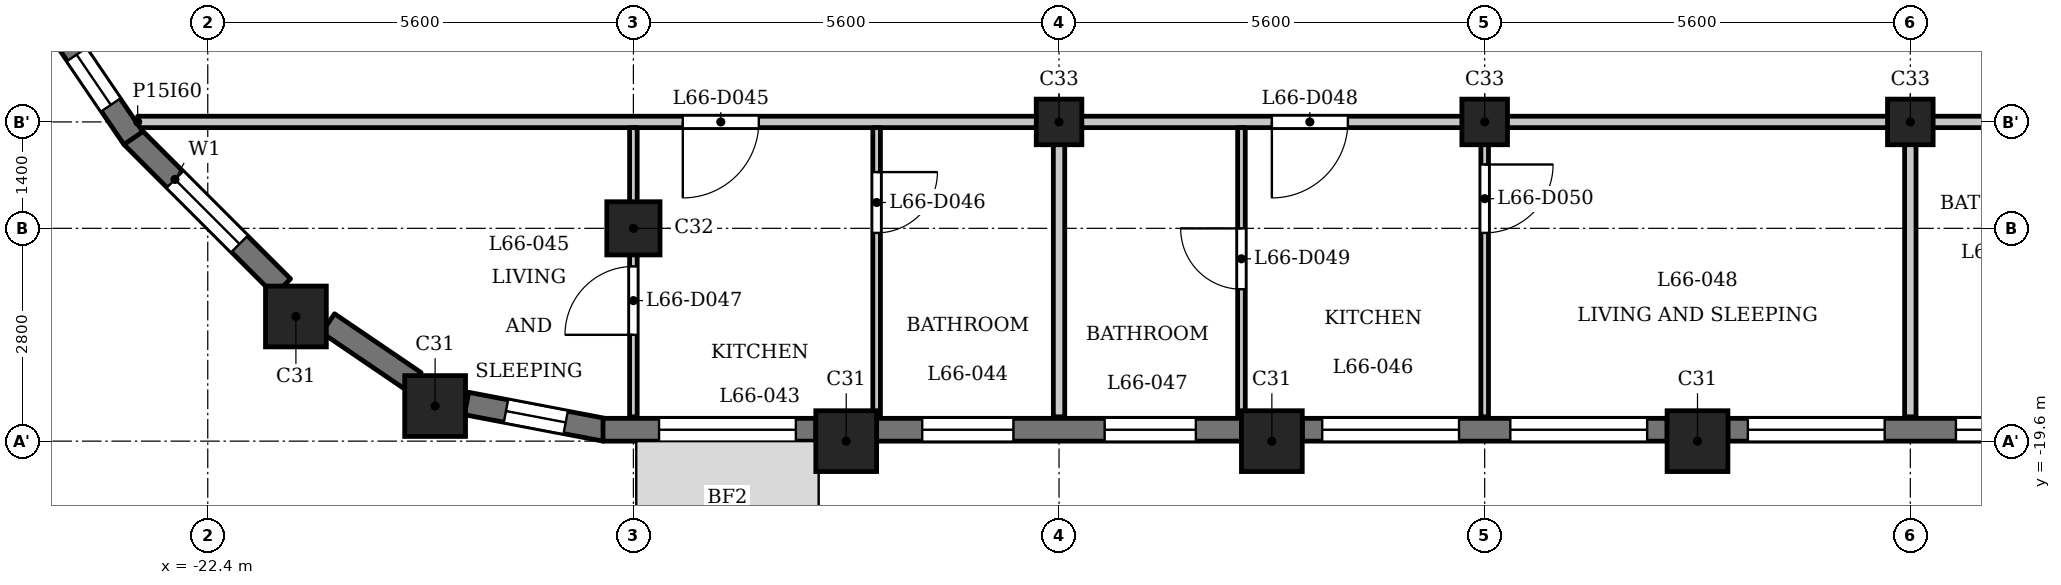
"""IFC4 building model, lengths in metres.
Left out: names, types, materials, properties, quantities, classifications, styles, units other than length and angle.
Written with IfcOpenShell. Run it as: python <this file> out.ifc"""

import sys

from ifc_helpers import new_model, si_unit, direction, frame, frame_2d, origin, origin_2d, place, context, subcontext, project, spatial, rectangle, extrude, element, fill, save


model = new_model("IFC4")
c1 = context("Model", 3, precision=1e-05, world=origin(), true_north=direction((0.0, 1.0)))
c2 = subcontext(c1, "Body", "Model", "MODEL_VIEW")
j1 = project(units=[si_unit("LENGTHUNIT", "METRE"), si_unit("PLANEANGLEUNIT", "RADIAN")], contexts=[c1])
p1 = place(None, origin())
s1 = spatial("IfcSite", under=j1, at=p1, CompositionType="ELEMENT")
p2 = place(p1, origin())
s2 = spatial("IfcBuilding", under=s1, at=p2, CompositionType="ELEMENT")
p3 = place(p2, frame((0.0, 0.0, 255.7)))
s3 = spatial("IfcBuildingStorey", under=s2, at=p3, CompositionType="ELEMENT", Elevation=255.7)
for number, where, z_axis, x_axis in (
    (1, (-19.409, -19.138, 0.0), (0.0, 0.0, 1.0), (1.0, 0.0, 0.0)),
    (2, (-14.0, -19.6, 0.0), (0.0, 0.0, 1.0), (1.0, 0.0, 0.0)),
    (3, (-8.4, -19.6, 0.0), (0.0, 0.0, 1.0), (1.0, 0.0, 0.0)),
    (4, (-2.8, -19.6, 0.0), (0.0, 0.0, 1.0), (1.0, 0.0, 0.0)),
    (5, (-21.24, -17.96, 0.0), (0.0, 0.0, 1.0), (1.0, 0.0, 0.0)),
):
    element("IfcColumn", number, at=place(p3, frame(where, z_axis=z_axis, x_axis=x_axis)), inside=s3, PredefinedType="COLUMN", context=c2, shape_type="SweptSolid", body=[
        extrude(rectangle(XDim=0.8, YDim=0.8, at=origin_2d()), origin(), (0.0, 0.0, 1.0), 3.5),
    ])
p4 = place(p3, frame((-16.8, -16.8, 0.0), z_axis=(0.0, 0.0, 1.0), x_axis=(1.0, 0.0, 0.0)))
e6 = element("IfcColumn", 6, at=p4, inside=s3, PredefinedType="COLUMN", context=c2, shape_type="SweptSolid", body=[
    extrude(rectangle(XDim=0.7, YDim=0.7, at=origin_2d()), origin(), (0.0, 0.0, 1.0), 3.5),
])
for number, where, z_axis, x_axis in (
    (7, (-11.2, -15.4, 0.0), (0.0, 0.0, 1.0), (1.0, 0.0, 0.0)),
    (8, (-5.6, -15.4, 0.0), (0.0, 0.0, 1.0), (1.0, 0.0, 0.0)),
    (9, (0.0, -15.4, 0.0), (0.0, 0.0, 1.0), (1.0, 0.0, 0.0)),
):
    element("IfcColumn", number, at=place(p3, frame(where, z_axis=z_axis, x_axis=x_axis)), inside=s3, PredefinedType="COLUMN", context=c2, shape_type="SweptSolid", body=[
        extrude(rectangle(XDim=0.6, YDim=0.6, at=origin_2d()), origin(), (0.0, 0.0, 1.0), 3.5),
    ])
p5 = place(p3, frame((-23.397, -15.591, 0.0), z_axis=(0.0, 0.0, 1.0), x_axis=(0.707150377276, -0.707063182409, 0.0)))
e10 = element("IfcWall", 10, at=p5, inside=s3, PredefinedType="SOLIDWALL", context=c2, shape_type="SweptSolid", body=[
    extrude(rectangle(XDim=2.8, YDim=0.3, at=frame_2d((1.4, 0.0))), origin(), (0.0, 0.0, 1.0), 2.55),
])
p6 = place(p5, frame((0.8, 0.0, 0.6)))
e11 = element("IfcOpeningElement", 11, at=p6, cuts=e10, PredefinedType="OPENING", context=c2, shape_type="SweptSolid", body=[
    extrude(rectangle(XDim=1.2, YDim=1.55, at=frame_2d((0.6, 0.775))), frame((0.0, 0.16, 0.0), z_axis=(0.0, -1.0, 0.0), x_axis=(1.0, 0.0, 0.0)), (0.0, 0.0, 1.0), 0.32),
])
p7 = place(p3, frame((-20.817, -18.048, 0.0), z_axis=(0.0, 0.0, 1.0), x_axis=(0.827025410886, -0.562164539747, 0.0)))
e12 = element("IfcWall", 12, at=p7, inside=s3, PredefinedType="SOLIDWALL", context=c2, shape_type="SweptSolid", body=[
    extrude(rectangle(XDim=1.377, YDim=0.3, at=frame_2d((0.688, 0.0))), origin(), (0.0, 0.0, 1.0), 2.55),
])
p8 = place(p3, frame((-18.995, -19.105, 0.0), z_axis=(0.0, 0.0, 1.0), x_axis=(0.982301706131, -0.187305520826, 0.0)))
e13 = element("IfcWall", 13, at=p8, inside=s3, PredefinedType="SOLIDWALL", context=c2, shape_type="SweptSolid", body=[
    extrude(rectangle(XDim=1.856, YDim=0.3, at=frame_2d((0.928, 0.0))), origin(), (0.0, 0.0, 1.0), 2.55),
])
p9 = place(p8, frame((0.528, 0.0, 0.6)))
e14 = element("IfcOpeningElement", 14, at=p9, cuts=e13, PredefinedType="OPENING", context=c2, shape_type="SweptSolid", body=[
    extrude(rectangle(XDim=0.8, YDim=1.55, at=frame_2d((0.4, 0.775))), frame((0.0, 0.16, 0.0), z_axis=(0.0, -1.0, 0.0), x_axis=(1.0, 0.0, 0.0)), (0.0, 0.0, 1.0), 0.32),
])
p10 = place(p3, frame((-17.2, -19.45, 0.0), z_axis=(0.0, 0.0, 1.0), x_axis=(1.0, 0.0, 0.0)))
e15 = element("IfcWall", 15, at=p10, inside=s3, PredefinedType="SOLIDWALL", context=c2, shape_type="SweptSolid", body=[
    extrude(rectangle(XDim=2.8, YDim=0.3, at=frame_2d((1.4, 0.0))), origin(), (0.0, 0.0, 1.0), 2.55),
])
p11 = place(p10, frame((0.738, 0.0, 0.9)))
e16 = element("IfcOpeningElement", 16, at=p11, cuts=e15, PredefinedType="OPENING", context=c2, shape_type="SweptSolid", body=[
    extrude(rectangle(XDim=1.8, YDim=1.25, at=frame_2d((0.9, 0.625))), frame((0.0, 0.16, 0.0), z_axis=(0.0, -1.0, 0.0), x_axis=(1.0, 0.0, 0.0)), (0.0, 0.0, 1.0), 0.32),
])
p12 = place(p3, frame((-13.6, -19.45, 0.0), z_axis=(0.0, 0.0, 1.0), x_axis=(1.0, 0.0, 0.0)))
e17 = element("IfcWall", 17, at=p12, inside=s3, PredefinedType="SOLIDWALL", context=c2, shape_type="SweptSolid", body=[
    extrude(rectangle(XDim=4.8, YDim=0.3, at=frame_2d((2.4, 0.0))), origin(), (0.0, 0.0, 1.0), 2.55),
])
p13 = place(p12, frame((0.6, 0.0, 0.6)))
e18 = element("IfcOpeningElement", 18, at=p13, cuts=e17, PredefinedType="OPENING", context=c2, shape_type="SweptSolid", body=[
    extrude(rectangle(XDim=1.2, YDim=1.55, at=frame_2d((0.6, 0.775))), frame((0.0, 0.16, 0.0), z_axis=(0.0, -1.0, 0.0), x_axis=(1.0, 0.0, 0.0)), (0.0, 0.0, 1.0), 0.32),
])
p14 = place(p12, frame((3.0, 0.0, 0.6)))
e19 = element("IfcOpeningElement", 19, at=p14, cuts=e17, PredefinedType="OPENING", context=c2, shape_type="SweptSolid", body=[
    extrude(rectangle(XDim=1.2, YDim=1.55, at=frame_2d((0.6, 0.775))), frame((0.0, 0.16, 0.0), z_axis=(0.0, -1.0, 0.0), x_axis=(1.0, 0.0, 0.0)), (0.0, 0.0, 1.0), 0.32),
])
p15 = place(p3, frame((-8.0, -19.45, 0.0), z_axis=(0.0, 0.0, 1.0), x_axis=(1.0, 0.0, 0.0)))
e20 = element("IfcWall", 20, at=p15, inside=s3, PredefinedType="SOLIDWALL", context=c2, shape_type="SweptSolid", body=[
    extrude(rectangle(XDim=4.8, YDim=0.3, at=frame_2d((2.4, 0.0))), origin(), (0.0, 0.0, 1.0), 2.55),
])
p16 = place(p15, frame((0.262, 0.0, 0.9)))
e21 = element("IfcOpeningElement", 21, at=p16, cuts=e20, PredefinedType="OPENING", context=c2, shape_type="SweptSolid", body=[
    extrude(rectangle(XDim=1.8, YDim=1.25, at=frame_2d((0.9, 0.625))), frame((0.0, 0.16, 0.0), z_axis=(0.0, -1.0, 0.0), x_axis=(1.0, 0.0, 0.0)), (0.0, 0.0, 1.0), 0.32),
])
p17 = place(p15, frame((2.738, 0.0, 0.9)))
e22 = element("IfcOpeningElement", 22, at=p17, cuts=e20, PredefinedType="OPENING", context=c2, shape_type="SweptSolid", body=[
    extrude(rectangle(XDim=1.8, YDim=1.25, at=frame_2d((0.9, 0.625))), frame((0.0, 0.16, 0.0), z_axis=(0.0, -1.0, 0.0), x_axis=(1.0, 0.0, 0.0)), (0.0, 0.0, 1.0), 0.32),
])
p18 = place(p3, frame((-2.4, -19.45, 0.0), z_axis=(0.0, 0.0, 1.0), x_axis=(1.0, 0.0, 0.0)))
e23 = element("IfcWall", 23, at=p18, inside=s3, PredefinedType="SOLIDWALL", context=c2, shape_type="SweptSolid", body=[
    extrude(rectangle(XDim=4.8, YDim=0.3, at=frame_2d((2.4, 0.0))), origin(), (0.0, 0.0, 1.0), 2.55),
])
p19 = place(p18, frame((0.262, 0.0, 0.9)))
e24 = element("IfcOpeningElement", 24, at=p19, cuts=e23, PredefinedType="OPENING", context=c2, shape_type="SweptSolid", body=[
    extrude(rectangle(XDim=1.8, YDim=1.25, at=frame_2d((0.9, 0.625))), frame((0.0, 0.16, 0.0), z_axis=(0.0, -1.0, 0.0), x_axis=(1.0, 0.0, 0.0)), (0.0, 0.0, 1.0), 0.32),
])
p20 = place(p18, frame((3.0, 0.0, 0.6)))
e25 = element("IfcOpeningElement", 25, at=p20, cuts=e23, PredefinedType="OPENING", context=c2, shape_type="SweptSolid", body=[
    extrude(rectangle(XDim=1.2, YDim=1.55, at=frame_2d((0.6, 0.775))), frame((0.0, 0.16, 0.0), z_axis=(0.0, -1.0, 0.0), x_axis=(1.0, 0.0, 0.0)), (0.0, 0.0, 1.0), 0.32),
])
p21 = place(p3, frame((-24.422, -14.078, 0.0), z_axis=(0.0, 0.0, 1.0), x_axis=(0.562054549384, -0.827100165347, 0.0)))
e26 = element("IfcWall", 26, at=p21, inside=s3, PredefinedType="SOLIDWALL", context=c2, shape_type="SweptSolid", body=[
    extrude(rectangle(XDim=1.856, YDim=0.3, at=frame_2d((0.928, 0.0))), origin(), (0.0, 0.0, 1.0), 2.55),
])
p22 = place(p21, frame((0.528, 0.0, 0.6)))
e27 = element("IfcOpeningElement", 27, at=p22, cuts=e26, PredefinedType="OPENING", context=c2, shape_type="SweptSolid", body=[
    extrude(rectangle(XDim=0.8, YDim=1.55, at=frame_2d((0.4, 0.775))), frame((0.0, 0.16, 0.0), z_axis=(0.0, -1.0, 0.0), x_axis=(1.0, 0.0, 0.0)), (0.0, 0.0, 1.0), 0.32),
])
p23 = place(p3, frame((-23.322, -15.4, 0.0), z_axis=(0.0, 0.0, 1.0), x_axis=(1.0, 0.0, 0.0)))
e28 = element("IfcWall", 28, at=p23, inside=s3, PredefinedType="PARTITIONING", context=c2, shape_type="SweptSolid", body=[
    extrude(rectangle(XDim=46.872, YDim=0.15, at=frame_2d((23.436, 0.0))), origin(), (0.0, 0.0, 1.0), 3.2),
])
p24 = place(p23, frame((7.172, 0.0, 0.0)))
e29 = element("IfcOpeningElement", 29, at=p24, cuts=e28, PredefinedType="OPENING", context=c2, shape_type="SweptSolid", body=[
    extrude(rectangle(XDim=1.0, YDim=2.1, at=frame_2d((0.5, 1.05))), frame((0.0, 0.085, 0.0), z_axis=(0.0, -1.0, 0.0), x_axis=(1.0, 0.0, 0.0)), (0.0, 0.0, 1.0), 0.17),
])
p25 = place(p23, frame((14.922, 0.0, 0.0)))
e30 = element("IfcOpeningElement", 30, at=p25, cuts=e28, PredefinedType="OPENING", context=c2, shape_type="SweptSolid", body=[
    extrude(rectangle(XDim=1.0, YDim=2.1, at=frame_2d((0.5, 1.05))), frame((0.0, 0.085, 0.0), z_axis=(0.0, -1.0, 0.0), x_axis=(1.0, 0.0, 0.0)), (0.0, 0.0, 1.0), 0.17),
])
p26 = place(p23, frame((26.372, 0.0, 0.0)))
e31 = element("IfcOpeningElement", 31, at=p26, cuts=e28, PredefinedType="OPENING", context=c2, shape_type="SweptSolid", body=[
    extrude(rectangle(XDim=1.0, YDim=2.1, at=frame_2d((0.5, 1.05))), frame((0.0, 0.085, 0.0), z_axis=(0.0, -1.0, 0.0), x_axis=(1.0, 0.0, 0.0)), (0.0, 0.0, 1.0), 0.17),
])
p27 = place(p23, frame((38.572, 0.0, 0.0)))
e32 = element("IfcOpeningElement", 32, at=p27, cuts=e28, PredefinedType="OPENING", context=c2, shape_type="SweptSolid", body=[
    extrude(rectangle(XDim=1.0, YDim=2.1, at=frame_2d((0.5, 1.05))), frame((0.0, 0.085, 0.0), z_axis=(0.0, -1.0, 0.0), x_axis=(1.0, 0.0, 0.0)), (0.0, 0.0, 1.0), 0.17),
])
p28 = place(p3, frame((-16.8, -19.28, 0.0), z_axis=(0.0, 0.0, 1.0), x_axis=(0.0, 1.0, 0.0)))
e33 = element("IfcWall", 33, at=p28, inside=s3, PredefinedType="PARTITIONING", context=c2, shape_type="SweptSolid", body=[
    extrude(rectangle(XDim=3.805, YDim=0.1, at=frame_2d((1.902, 0.0))), origin(), (0.0, 0.0, 1.0), 3.2),
])
p29 = place(p28, frame((1.079, 0.0, 0.0)))
e34 = element("IfcOpeningElement", 34, at=p29, cuts=e33, PredefinedType="OPENING", context=c2, shape_type="SweptSolid", body=[
    extrude(rectangle(XDim=0.9, YDim=2.1, at=frame_2d((0.45, 1.05))), frame((0.0, 0.06, 0.0), z_axis=(0.0, -1.0, 0.0), x_axis=(1.0, 0.0, 0.0)), (0.0, 0.0, 1.0), 0.12),
])
p30 = place(p3, frame((-13.6, -19.28, 0.0), z_axis=(0.0, 0.0, 1.0), x_axis=(0.0, 1.0, 0.0)))
e35 = element("IfcWall", 35, at=p30, inside=s3, PredefinedType="PARTITIONING", context=c2, shape_type="SweptSolid", body=[
    extrude(rectangle(XDim=3.805, YDim=0.1, at=frame_2d((1.902, 0.0))), origin(), (0.0, 0.0, 1.0), 3.2),
])
p31 = place(p30, frame((2.42, 0.0, 0.0)))
e36 = element("IfcOpeningElement", 36, at=p31, cuts=e35, PredefinedType="OPENING", context=c2, shape_type="SweptSolid", body=[
    extrude(rectangle(XDim=0.8, YDim=2.1, at=frame_2d((0.4, 1.05))), frame((0.0, 0.06, 0.0), z_axis=(0.0, -1.0, 0.0), x_axis=(1.0, 0.0, 0.0)), (0.0, 0.0, 1.0), 0.12),
])
p32 = place(p3, frame((-11.2, -19.28, 0.0), z_axis=(0.0, 0.0, 1.0), x_axis=(0.0, 1.0, 0.0)))
e37 = element("IfcWall", 37, at=p32, inside=s3, PredefinedType="PARTITIONING", context=c2, shape_type="SweptSolid", body=[
    extrude(rectangle(XDim=3.805, YDim=0.15, at=frame_2d((1.902, 0.0))), origin(), (0.0, 0.0, 1.0), 3.2),
])
p33 = place(p3, frame((-8.8, -19.28, 0.0), z_axis=(0.0, 0.0, 1.0), x_axis=(0.0, 1.0, 0.0)))
e38 = element("IfcWall", 38, at=p33, inside=s3, PredefinedType="PARTITIONING", context=c2, shape_type="SweptSolid", body=[
    extrude(rectangle(XDim=3.805, YDim=0.1, at=frame_2d((1.902, 0.0))), origin(), (0.0, 0.0, 1.0), 3.2),
])
p34 = place(p33, frame((1.679, 0.0, 0.0)))
e39 = element("IfcOpeningElement", 39, at=p34, cuts=e38, PredefinedType="OPENING", context=c2, shape_type="SweptSolid", body=[
    extrude(rectangle(XDim=0.8, YDim=2.1, at=frame_2d((0.4, 1.05))), frame((0.0, 0.06, 0.0), z_axis=(0.0, -1.0, 0.0), x_axis=(1.0, 0.0, 0.0)), (0.0, 0.0, 1.0), 0.12),
])
p35 = place(p3, frame((-5.6, -19.28, 0.0), z_axis=(0.0, 0.0, 1.0), x_axis=(0.0, 1.0, 0.0)))
e40 = element("IfcWall", 40, at=p35, inside=s3, PredefinedType="PARTITIONING", context=c2, shape_type="SweptSolid", body=[
    extrude(rectangle(XDim=3.805, YDim=0.1, at=frame_2d((1.902, 0.0))), origin(), (0.0, 0.0, 1.0), 3.2),
])
p36 = place(p35, frame((2.42, 0.0, 0.0)))
e41 = element("IfcOpeningElement", 41, at=p36, cuts=e40, PredefinedType="OPENING", context=c2, shape_type="SweptSolid", body=[
    extrude(rectangle(XDim=0.9, YDim=2.1, at=frame_2d((0.45, 1.05))), frame((0.0, 0.06, 0.0), z_axis=(0.0, -1.0, 0.0), x_axis=(1.0, 0.0, 0.0)), (0.0, 0.0, 1.0), 0.12),
])
p37 = place(p3, frame((0.0, -19.28, 0.0), z_axis=(0.0, 0.0, 1.0), x_axis=(0.0, 1.0, 0.0)))
e42 = element("IfcWall", 42, at=p37, inside=s3, PredefinedType="PARTITIONING", context=c2, shape_type="SweptSolid", body=[
    extrude(rectangle(XDim=3.805, YDim=0.15, at=frame_2d((1.902, 0.0))), origin(), (0.0, 0.0, 1.0), 3.2),
])
p38 = place(p24, origin())
e43 = element("IfcDoor", 43, at=p38, inside=s3, OperationType="SINGLE_SWING_LEFT", PredefinedType="DOOR", context=c2, shape_type="SweptSolid", body=[
    extrude(rectangle(XDim=1.0, YDim=2.1, at=frame_2d((0.5, 1.05))), frame((0.0, 0.025, 0.0), z_axis=(0.0, -1.0, 0.0), x_axis=(1.0, 0.0, 0.0)), (0.0, 0.0, 1.0), 0.05),
])
fill(e29, e43)
p39 = place(p31, origin())
e44 = element("IfcDoor", 44, at=p39, inside=s3, OperationType="SINGLE_SWING_RIGHT", PredefinedType="DOOR", context=c2, shape_type="SweptSolid", body=[
    extrude(rectangle(XDim=0.8, YDim=2.1, at=frame_2d((0.4, 1.05))), frame((0.0, 0.025, 0.0), z_axis=(0.0, -1.0, 0.0), x_axis=(1.0, 0.0, 0.0)), (0.0, 0.0, 1.0), 0.05),
])
fill(e36, e44)
p40 = place(p29, origin())
e45 = element("IfcDoor", 45, at=p40, inside=s3, OperationType="SINGLE_SWING_RIGHT", PredefinedType="DOOR", context=c2, shape_type="SweptSolid", body=[
    extrude(rectangle(XDim=0.9, YDim=2.1, at=frame_2d((0.45, 1.05))), frame((0.0, 0.025, 0.0), z_axis=(0.0, -1.0, 0.0), x_axis=(1.0, 0.0, 0.0)), (0.0, 0.0, 1.0), 0.05),
])
fill(e34, e45)
p41 = place(p25, origin())
e46 = element("IfcDoor", 46, at=p41, inside=s3, OperationType="SINGLE_SWING_LEFT", PredefinedType="DOOR", context=c2, shape_type="SweptSolid", body=[
    extrude(rectangle(XDim=1.0, YDim=2.1, at=frame_2d((0.5, 1.05))), frame((0.0, 0.025, 0.0), z_axis=(0.0, -1.0, 0.0), x_axis=(1.0, 0.0, 0.0)), (0.0, 0.0, 1.0), 0.05),
])
fill(e30, e46)
p42 = place(p34, origin())
e47 = element("IfcDoor", 47, at=p42, inside=s3, OperationType="SINGLE_SWING_LEFT", PredefinedType="DOOR", context=c2, shape_type="SweptSolid", body=[
    extrude(rectangle(XDim=0.8, YDim=2.1, at=frame_2d((0.4, 1.05))), frame((0.0, 0.025, 0.0), z_axis=(0.0, -1.0, 0.0), x_axis=(1.0, 0.0, 0.0)), (0.0, 0.0, 1.0), 0.05),
])
fill(e39, e47)
p43 = place(p36, origin())
e48 = element("IfcDoor", 48, at=p43, inside=s3, OperationType="SINGLE_SWING_RIGHT", PredefinedType="DOOR", context=c2, shape_type="SweptSolid", body=[
    extrude(rectangle(XDim=0.9, YDim=2.1, at=frame_2d((0.45, 1.05))), frame((0.0, 0.025, 0.0), z_axis=(0.0, -1.0, 0.0), x_axis=(1.0, 0.0, 0.0)), (0.0, 0.0, 1.0), 0.05),
])
fill(e41, e48)
p44 = place(p6, origin())
e49 = element("IfcWindow", 49, at=p44, inside=s3, PartitioningType="SINGLE_PANEL", PredefinedType="WINDOW", context=c2, shape_type="SweptSolid", body=[
    extrude(rectangle(XDim=1.2, YDim=1.55, at=frame_2d((0.6, 0.775))), frame((0.0, 0.03, 0.0), z_axis=(0.0, -1.0, 0.0), x_axis=(1.0, 0.0, 0.0)), (0.0, 0.0, 1.0), 0.06),
])
fill(e11, e49)
p45 = place(p9, origin())
e50 = element("IfcWindow", 50, at=p45, inside=s3, PartitioningType="SINGLE_PANEL", PredefinedType="WINDOW", context=c2, shape_type="SweptSolid", body=[
    extrude(rectangle(XDim=0.8, YDim=1.55, at=frame_2d((0.4, 0.775))), frame((0.0, 0.03, 0.0), z_axis=(0.0, -1.0, 0.0), x_axis=(1.0, 0.0, 0.0)), (0.0, 0.0, 1.0), 0.06),
])
fill(e14, e50)
p46 = place(p11, origin())
e51 = element("IfcWindow", 51, at=p46, inside=s3, PartitioningType="SINGLE_PANEL", PredefinedType="WINDOW", context=c2, shape_type="SweptSolid", body=[
    extrude(rectangle(XDim=1.8, YDim=1.25, at=frame_2d((0.9, 0.625))), frame((0.0, 0.03, 0.0), z_axis=(0.0, -1.0, 0.0), x_axis=(1.0, 0.0, 0.0)), (0.0, 0.0, 1.0), 0.06),
])
fill(e16, e51)
p47 = place(p13, origin())
e52 = element("IfcWindow", 52, at=p47, inside=s3, PartitioningType="SINGLE_PANEL", PredefinedType="WINDOW", context=c2, shape_type="SweptSolid", body=[
    extrude(rectangle(XDim=1.2, YDim=1.55, at=frame_2d((0.6, 0.775))), frame((0.0, 0.03, 0.0), z_axis=(0.0, -1.0, 0.0), x_axis=(1.0, 0.0, 0.0)), (0.0, 0.0, 1.0), 0.06),
])
fill(e18, e52)
p48 = place(p14, origin())
e53 = element("IfcWindow", 53, at=p48, inside=s3, PartitioningType="SINGLE_PANEL", PredefinedType="WINDOW", context=c2, shape_type="SweptSolid", body=[
    extrude(rectangle(XDim=1.2, YDim=1.55, at=frame_2d((0.6, 0.775))), frame((0.0, 0.03, 0.0), z_axis=(0.0, -1.0, 0.0), x_axis=(1.0, 0.0, 0.0)), (0.0, 0.0, 1.0), 0.06),
])
fill(e19, e53)
p49 = place(p16, origin())
e54 = element("IfcWindow", 54, at=p49, inside=s3, PartitioningType="SINGLE_PANEL", PredefinedType="WINDOW", context=c2, shape_type="SweptSolid", body=[
    extrude(rectangle(XDim=1.8, YDim=1.25, at=frame_2d((0.9, 0.625))), frame((0.0, 0.03, 0.0), z_axis=(0.0, -1.0, 0.0), x_axis=(1.0, 0.0, 0.0)), (0.0, 0.0, 1.0), 0.06),
])
fill(e21, e54)
p50 = place(p17, origin())
e55 = element("IfcWindow", 55, at=p50, inside=s3, PartitioningType="SINGLE_PANEL", PredefinedType="WINDOW", context=c2, shape_type="SweptSolid", body=[
    extrude(rectangle(XDim=1.8, YDim=1.25, at=frame_2d((0.9, 0.625))), frame((0.0, 0.03, 0.0), z_axis=(0.0, -1.0, 0.0), x_axis=(1.0, 0.0, 0.0)), (0.0, 0.0, 1.0), 0.06),
])
fill(e22, e55)
p51 = place(p19, origin())
e56 = element("IfcWindow", 56, at=p51, inside=s3, PartitioningType="SINGLE_PANEL", PredefinedType="WINDOW", context=c2, shape_type="SweptSolid", body=[
    extrude(rectangle(XDim=1.8, YDim=1.25, at=frame_2d((0.9, 0.625))), frame((0.0, 0.03, 0.0), z_axis=(0.0, -1.0, 0.0), x_axis=(1.0, 0.0, 0.0)), (0.0, 0.0, 1.0), 0.06),
])
fill(e24, e56)
p52 = place(p20, origin())
e57 = element("IfcWindow", 57, at=p52, inside=s3, PartitioningType="SINGLE_PANEL", PredefinedType="WINDOW", context=c2, shape_type="SweptSolid", body=[
    extrude(rectangle(XDim=1.2, YDim=1.55, at=frame_2d((0.6, 0.775))), frame((0.0, 0.03, 0.0), z_axis=(0.0, -1.0, 0.0), x_axis=(1.0, 0.0, 0.0)), (0.0, 0.0, 1.0), 0.06),
])
fill(e25, e57)
p53 = place(p22, origin())
e58 = element("IfcWindow", 58, at=p53, inside=s3, PartitioningType="SINGLE_PANEL", PredefinedType="WINDOW", context=c2, shape_type="SweptSolid", body=[
    extrude(rectangle(XDim=0.8, YDim=1.55, at=frame_2d((0.4, 0.775))), frame((0.0, 0.03, 0.0), z_axis=(0.0, -1.0, 0.0), x_axis=(1.0, 0.0, 0.0)), (0.0, 0.0, 1.0), 0.06),
])
fill(e27, e58)
save(model, sys.argv[1])
